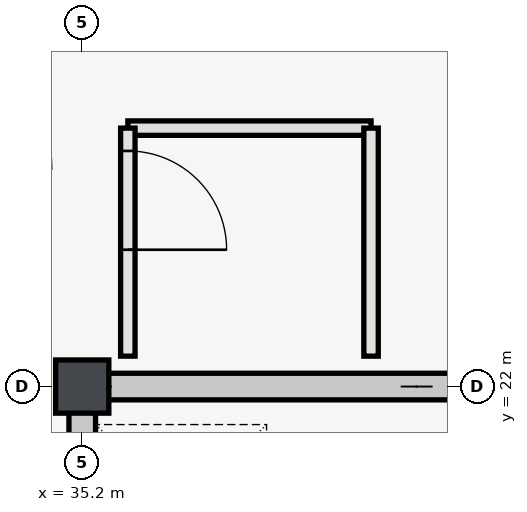
"""IFC4 building model, lengths in metres.
Left out: names, types, materials, properties, quantities, classifications, styles, units other than length and angle.
Written with IfcOpenShell. Run it as: python <this file> out.ifc"""

import sys

from ifc_helpers import new_model, si_unit, direction, frame, frame_2d, origin, origin_2d, place, context, subcontext, project, spatial, rectangle, extrude, element, fill, save


model = new_model("IFC4")
c1 = context("Model", 3, precision=1e-05, world=origin(), true_north=direction((0.0, 1.0)))
c2 = subcontext(c1, "Body", "Model", "MODEL_VIEW")
j1 = project(units=[si_unit("LENGTHUNIT", "METRE"), si_unit("PLANEANGLEUNIT", "RADIAN")], contexts=[c1])
p1 = place(None, origin())
s1 = spatial("IfcSite", under=j1, at=p1, CompositionType="ELEMENT")
p2 = place(p1, origin())
s2 = spatial("IfcBuilding", under=s1, at=p2, CompositionType="ELEMENT")
p3 = place(p2, origin())
s3 = spatial("IfcBuildingStorey", under=s2, at=p3, CompositionType="ELEMENT", Elevation=0.0)
p4 = place(p3, frame((35.2, 22.0, 0.0), z_axis=(0.0, 0.0, 1.0), x_axis=(1.0, 0.0, 0.0)))
e1 = element("IfcColumn", 1, at=p4, inside=s3, PredefinedType="COLUMN", context=c2, shape_type="SweptSolid", body=[
    extrude(rectangle(XDim=0.7, YDim=0.7, at=origin_2d()), origin(), (0.0, 0.0, 1.0), 5.4),
])
p5 = place(p3, frame((44.175, 22.0, 0.0), z_axis=(0.0, 0.0, 1.0), x_axis=(-1.0, 0.0, 0.0)))
e2 = element("IfcWall", 2, at=p5, inside=s3, PredefinedType="SHEAR", context=c2, shape_type="SweptSolid", body=[
    extrude(rectangle(XDim=9.15, YDim=0.35, at=frame_2d((4.575, 0.0))), origin(), (0.0, 0.0, 1.0), 5.12),
])
p6 = place(p3, frame((35.2, 14.175, 0.0), z_axis=(0.0, 0.0, 1.0), x_axis=(0.0, 1.0, 0.0)))
e3 = element("IfcWall", 3, at=p6, inside=s3, PredefinedType="SHEAR", context=c2, shape_type="SweptSolid", body=[
    extrude(rectangle(XDim=7.65, YDim=0.35, at=frame_2d((3.825, 0.0))), origin(), (0.0, 0.0, 1.0), 5.12),
])
p7 = place(p6, frame((1.65, 0.0, 0.0)))
e4 = element("IfcOpeningElement", 4, at=p7, cuts=e3, PredefinedType="OPENING", context=c2, shape_type="SweptSolid", body=[
    extrude(rectangle(XDim=1.35, YDim=2.2, at=frame_2d((0.675, 1.1))), frame((0.0, 0.185, 0.0), z_axis=(0.0, -1.0, 0.0), x_axis=(1.0, 0.0, 0.0)), (0.0, 0.0, 1.0), 0.37),
])
p8 = place(p6, frame((5.725, 0.0, 0.0)))
e5 = element("IfcOpeningElement", 5, at=p8, cuts=e3, PredefinedType="OPENING", context=c2, shape_type="SweptSolid", body=[
    extrude(rectangle(XDim=1.0, YDim=2.15, at=frame_2d((0.5, 1.075))), frame((0.0, 0.185, 0.0), z_axis=(0.0, -1.0, 0.0), x_axis=(1.0, 0.0, 0.0)), (0.0, 0.0, 1.0), 0.37),
])
p9 = place(p3, frame((39.0, 25.4, 0.0), z_axis=(0.0, 0.0, 1.0), x_axis=(-1.0, 0.0, 0.0)))
e6 = element("IfcWall", 6, at=p9, inside=s3, PredefinedType="PARTITIONING", context=c2, shape_type="SweptSolid", body=[
    extrude(rectangle(XDim=3.2, YDim=0.19, at=frame_2d((1.6, 0.0))), origin(), (0.0, 0.0, 1.0), 5.12),
])
p10 = place(p3, frame((35.8, 25.4, 0.0), z_axis=(0.0, 0.0, 1.0), x_axis=(0.0, -1.0, 0.0)))
e7 = element("IfcWall", 7, at=p10, inside=s3, PredefinedType="PARTITIONING", context=c2, shape_type="SweptSolid", body=[
    extrude(rectangle(XDim=3.0, YDim=0.19, at=frame_2d((1.5, 0.0))), origin(), (0.0, 0.0, 1.0), 5.12),
])
p11 = place(p10, frame((0.3, 0.0, 0.0)))
e8 = element("IfcOpeningElement", 8, at=p11, cuts=e7, PredefinedType="OPENING", context=c2, shape_type="SweptSolid", body=[
    extrude(rectangle(XDim=1.3, YDim=2.2, at=frame_2d((0.65, 1.1))), frame((0.0, 0.105, 0.0), z_axis=(0.0, -1.0, 0.0), x_axis=(1.0, 0.0, 0.0)), (0.0, 0.0, 1.0), 0.21),
])
p12 = place(p3, frame((39.0, 22.4, 0.0), z_axis=(0.0, 0.0, 1.0), x_axis=(0.0, 1.0, 0.0)))
e9 = element("IfcWall", 9, at=p12, inside=s3, PredefinedType="PARTITIONING", context=c2, shape_type="SweptSolid", body=[
    extrude(rectangle(XDim=3.0, YDim=0.19, at=frame_2d((1.5, 0.0))), origin(), (0.0, 0.0, 1.0), 5.12),
])
p13 = place(p11, origin())
e10 = element("IfcDoor", 10, at=p13, inside=s3, OperationType="SINGLE_SWING_RIGHT", PredefinedType="DOOR", context=c2, shape_type="SweptSolid", body=[
    extrude(rectangle(XDim=1.3, YDim=2.2, at=frame_2d((0.65, 1.1))), frame((0.0, 0.025, 0.0), z_axis=(0.0, -1.0, 0.0), x_axis=(1.0, 0.0, 0.0)), (0.0, 0.0, 1.0), 0.05),
])
fill(e8, e10)
save(model, sys.argv[1])
